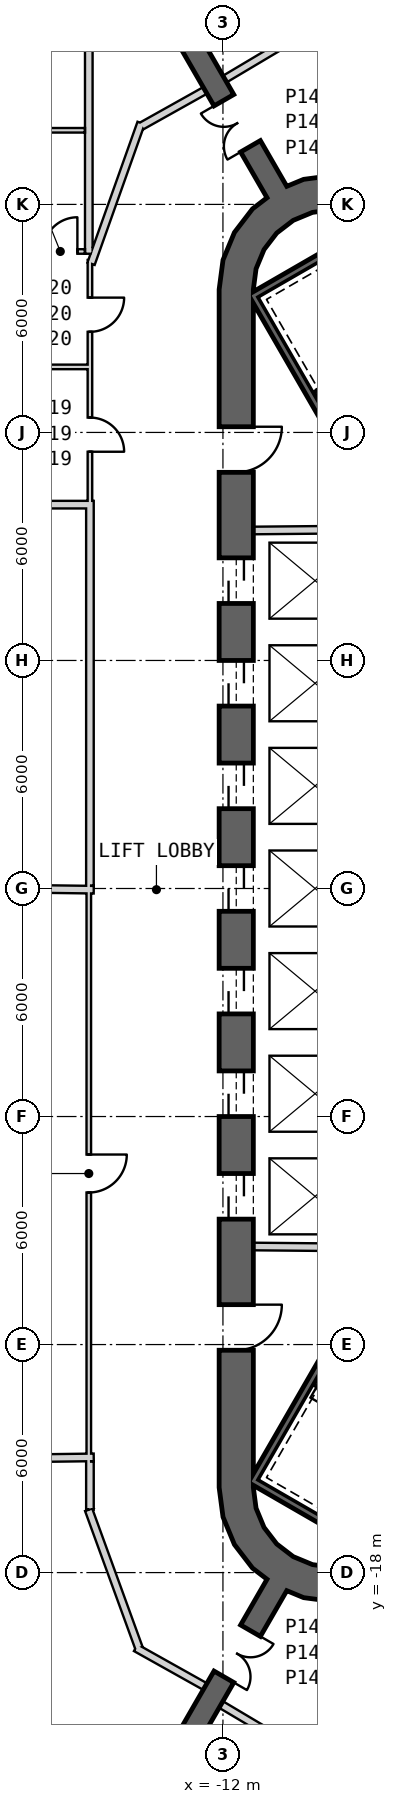
"""IFC4 building model, lengths in metres.
Left out: names, types, materials, properties, quantities, classifications, styles, units other than length and angle.
Written with IfcOpenShell. Run it as: python <this file> out.ifc"""

import sys

from ifc_helpers import new_model, si_unit, direction, frame, frame_2d, origin, place, context, subcontext, project, spatial, polyline, rectangle, outline, extrude, element, fill, save


model = new_model("IFC4")
c1 = context("Model", 3, precision=1e-05, world=origin(), true_north=direction((0.0, 1.0)))
c2 = subcontext(c1, "Body", "Model", "MODEL_VIEW")
j1 = project(units=[si_unit("LENGTHUNIT", "METRE"), si_unit("PLANEANGLEUNIT", "RADIAN")], contexts=[c1])
p1 = place(None, origin())
s1 = spatial("IfcSite", under=j1, at=p1, CompositionType="ELEMENT")
p2 = place(p1, origin())
s2 = spatial("IfcBuilding", under=s1, at=p2, CompositionType="ELEMENT")
p3 = place(p2, frame((0.0, 0.0, 322.1)))
s3 = spatial("IfcBuildingStorey", under=s2, at=p3, CompositionType="ELEMENT", Elevation=322.1)
p4 = place(p3, frame((-11.65, 15.762, 0.0), z_axis=(0.0, 0.0, 1.0), x_axis=(0.0, -1.0, 0.0)))
e1 = element("IfcWall", 1, at=p4, inside=s3, PredefinedType="SHEAR", context=c2, shape_type="SweptSolid", body=[
    extrude(rectangle(XDim=31.523, YDim=0.9, at=frame_2d((15.762, 0.0))), origin(), (0.0, 0.0, 1.0), 3.9),
])
p5 = place(p4, frame((7.062, 0.0, 0.0)))
e2 = element("IfcOpeningElement", 2, at=p5, cuts=e1, PredefinedType="OPENING", context=c2, shape_type="SweptSolid", body=[
    extrude(rectangle(XDim=1.2, YDim=2.4, at=frame_2d((0.6, 1.2))), frame((0.0, 0.46, 0.0), z_axis=(0.0, -1.0, 0.0), x_axis=(1.0, 0.0, 0.0)), (0.0, 0.0, 1.0), 0.92),
])
p6 = place(p4, frame((9.762, 0.0, 0.0)))
e3 = element("IfcOpeningElement", 3, at=p6, cuts=e1, PredefinedType="OPENING", context=c2, shape_type="SweptSolid", body=[
    extrude(rectangle(XDim=1.2, YDim=2.4, at=frame_2d((0.6, 1.2))), frame((0.0, 0.46, 0.0), z_axis=(0.0, -1.0, 0.0), x_axis=(1.0, 0.0, 0.0)), (0.0, 0.0, 1.0), 0.92),
])
p7 = place(p4, frame((12.462, 0.0, 0.0)))
e4 = element("IfcOpeningElement", 4, at=p7, cuts=e1, PredefinedType="OPENING", context=c2, shape_type="SweptSolid", body=[
    extrude(rectangle(XDim=1.2, YDim=2.4, at=frame_2d((0.6, 1.2))), frame((0.0, 0.46, 0.0), z_axis=(0.0, -1.0, 0.0), x_axis=(1.0, 0.0, 0.0)), (0.0, 0.0, 1.0), 0.92),
])
p8 = place(p4, frame((15.162, 0.0, 0.0)))
e5 = element("IfcOpeningElement", 5, at=p8, cuts=e1, PredefinedType="OPENING", context=c2, shape_type="SweptSolid", body=[
    extrude(rectangle(XDim=1.2, YDim=2.4, at=frame_2d((0.6, 1.2))), frame((0.0, 0.46, 0.0), z_axis=(0.0, -1.0, 0.0), x_axis=(1.0, 0.0, 0.0)), (0.0, 0.0, 1.0), 0.92),
])
p9 = place(p4, frame((17.862, 0.0, 0.0)))
e6 = element("IfcOpeningElement", 6, at=p9, cuts=e1, PredefinedType="OPENING", context=c2, shape_type="SweptSolid", body=[
    extrude(rectangle(XDim=1.2, YDim=2.4, at=frame_2d((0.6, 1.2))), frame((0.0, 0.46, 0.0), z_axis=(0.0, -1.0, 0.0), x_axis=(1.0, 0.0, 0.0)), (0.0, 0.0, 1.0), 0.92),
])
p10 = place(p4, frame((20.562, 0.0, 0.0)))
e7 = element("IfcOpeningElement", 7, at=p10, cuts=e1, PredefinedType="OPENING", context=c2, shape_type="SweptSolid", body=[
    extrude(rectangle(XDim=1.2, YDim=2.4, at=frame_2d((0.6, 1.2))), frame((0.0, 0.46, 0.0), z_axis=(0.0, -1.0, 0.0), x_axis=(1.0, 0.0, 0.0)), (0.0, 0.0, 1.0), 0.92),
])
p11 = place(p4, frame((23.262, 0.0, 0.0)))
e8 = element("IfcOpeningElement", 8, at=p11, cuts=e1, PredefinedType="OPENING", context=c2, shape_type="SweptSolid", body=[
    extrude(rectangle(XDim=1.2, YDim=2.4, at=frame_2d((0.6, 1.2))), frame((0.0, 0.46, 0.0), z_axis=(0.0, -1.0, 0.0), x_axis=(1.0, 0.0, 0.0)), (0.0, 0.0, 1.0), 0.92),
])
p12 = place(p4, frame((3.612, 0.0, 0.0)))
e9 = element("IfcOpeningElement", 9, at=p12, cuts=e1, PredefinedType="OPENING", context=c2, shape_type="SweptSolid", body=[
    extrude(rectangle(XDim=1.2, YDim=2.4, at=frame_2d((0.6, 1.2))), frame((0.0, 0.46, 0.0), z_axis=(0.0, -1.0, 0.0), x_axis=(1.0, 0.0, 0.0)), (0.0, 0.0, 1.0), 0.92),
])
p13 = place(p4, frame((26.712, 0.0, 0.0)))
e10 = element("IfcOpeningElement", 10, at=p13, cuts=e1, PredefinedType="OPENING", context=c2, shape_type="SweptSolid", body=[
    extrude(rectangle(XDim=1.2, YDim=2.4, at=frame_2d((0.6, 1.2))), frame((0.0, 0.46, 0.0), z_axis=(0.0, -1.0, 0.0), x_axis=(1.0, 0.0, 0.0)), (0.0, 0.0, 1.0), 0.92),
])
p14 = place(p3, origin())
e11 = element("IfcWall", 11, at=p14, inside=s3, PredefinedType="SHEAR", context=c2, shape_type="SweptSolid", body=[
    extrude(outline(polyline([(-7.6, 18.36), (-8.323, 18.659), (-9.1, 18.762), (-9.876, 18.659), (-10.6, 18.36), (-11.221, 17.883), (-11.698, 17.262), (-11.998, 16.538), (-12.1, 15.762), (-11.2, 15.762), (-11.128, 16.305), (-10.919, 16.812), (-10.585, 17.247), (-10.15, 17.58), (-9.644, 17.79), (-9.1, 17.862), (-8.556, 17.79), (-8.05, 17.58), (-7.6, 18.36)])), origin(), (0.0, 0.0, 1.0), 3.9),
])
p15 = place(p3, origin())
e12 = element("IfcWall", 12, at=p15, inside=s3, PredefinedType="SHEAR", context=c2, shape_type="SweptSolid", body=[
    extrude(outline(polyline([(-12.1, -15.762), (-11.998, -16.538), (-11.698, -17.262), (-11.221, -17.883), (-10.6, -18.36), (-9.876, -18.659), (-9.1, -18.762), (-8.323, -18.659), (-7.6, -18.36), (-8.05, -17.58), (-8.556, -17.79), (-9.1, -17.862), (-9.644, -17.79), (-10.15, -17.58), (-10.585, -17.247), (-10.919, -16.812), (-11.128, -16.305), (-11.2, -15.762), (-12.1, -15.762)])), origin(), (0.0, 0.0, 1.0), 3.9),
])
p16 = place(p3, frame((-10.575, 18.316, 0.0), z_axis=(0.0, 0.0, 1.0), x_axis=(-0.499987805019, 0.866032444446, 0.0)))
e13 = element("IfcWall", 13, at=p16, inside=s3, PredefinedType="SHEAR", context=c2, shape_type="SweptSolid", body=[
    extrude(rectangle(XDim=8.787, YDim=0.6, at=frame_2d((4.394, 0.0))), origin(), (0.0, 0.0, 1.0), 3.9),
])
p17 = place(p16, frame((1.4, 0.0, 0.0)))
e14 = element("IfcOpeningElement", 14, at=p17, cuts=e13, PredefinedType="OPENING", context=c2, shape_type="SweptSolid", body=[
    extrude(rectangle(XDim=1.4, YDim=2.4, at=frame_2d((0.7, 1.2))), frame((0.0, 0.31, 0.0), z_axis=(0.0, -1.0, 0.0), x_axis=(1.0, 0.0, 0.0)), (0.0, 0.0, 1.0), 0.62),
])
p18 = place(p3, frame((-10.575, -18.316, 0.0), z_axis=(0.0, 0.0, 1.0), x_axis=(-0.499987805019, -0.866032444446, 0.0)))
e15 = element("IfcWall", 15, at=p18, inside=s3, PredefinedType="SHEAR", context=c2, shape_type="SweptSolid", body=[
    extrude(rectangle(XDim=8.787, YDim=0.6, at=frame_2d((4.394, 0.0))), origin(), (0.0, 0.0, 1.0), 3.9),
])
p19 = place(p18, frame((1.4, 0.0, 0.0)))
e16 = element("IfcOpeningElement", 16, at=p19, cuts=e15, PredefinedType="OPENING", context=c2, shape_type="SweptSolid", body=[
    extrude(rectangle(XDim=1.4, YDim=2.4, at=frame_2d((0.7, 1.2))), frame((0.0, 0.31, 0.0), z_axis=(0.0, -1.0, 0.0), x_axis=(1.0, 0.0, 0.0)), (0.0, 0.0, 1.0), 0.62),
])
p20 = place(p3, frame((-11.2, 9.42, 0.0), z_axis=(0.0, 0.0, 1.0), x_axis=(0.999957167047, 0.009255488683, 0.0)))
e17 = element("IfcWall", 17, at=p20, inside=s3, PredefinedType="PLUMBINGWALL", context=c2, shape_type="SweptSolid", body=[
    extrude(rectangle(XDim=3.35, YDim=0.2, at=frame_2d((1.675, 0.0))), origin(), (0.0, 0.0, 1.0), 3.6),
])
p21 = place(p3, frame((-8.05, -9.449, 0.0), z_axis=(0.0, 0.0, 1.0), x_axis=(-0.999957467379, 0.009222983926, 0.0)))
e18 = element("IfcWall", 18, at=p21, inside=s3, PredefinedType="PLUMBINGWALL", context=c2, shape_type="SweptSolid", body=[
    extrude(rectangle(XDim=3.15, YDim=0.2, at=frame_2d((1.575, 0.0))), origin(), (0.0, 0.0, 1.0), 3.6),
])
p22 = place(p3, frame((-11.245, 15.678, -0.3), z_axis=(0.0, 0.0, 1.0), x_axis=(0.499977274689, -0.866038523851, 0.0)))
e19 = element("IfcWall", 19, at=p22, inside=s3, PredefinedType="SHEAR", context=c2, shape_type="SweptSolid", body=[
    extrude(rectangle(XDim=8.1, YDim=0.2, at=frame_2d((4.05, 0.0))), origin(), (0.0, 0.0, 1.0), 3.9),
])
for number, where, z_axis, x_axis in (
    (20, (-7.818, 17.541, -0.3), (0.0, 0.0, 1.0), (-0.866, -0.5, 0.0)),
    (21, (-11.282, -15.541, -0.3), (0.0, 0.0, 1.0), (0.866, -0.5, 0.0)),
):
    element("IfcWall", number, at=place(p3, frame(where, z_axis=z_axis, x_axis=x_axis)), inside=s3, PredefinedType="SHEAR", context=c2, shape_type="SweptSolid", body=[
        extrude(rectangle(XDim=3.8, YDim=0.2, at=frame_2d((1.9, 0.0))), origin(), (0.0, 0.0, 1.0), 3.9),
    ])
p23 = place(p3, frame((-7.196, -8.663, -0.3), z_axis=(0.0, 0.0, 1.0), x_axis=(-0.499997992926, -0.866026562566, 0.0)))
e22 = element("IfcWall", 22, at=p23, inside=s3, PredefinedType="SHEAR", context=c2, shape_type="SweptSolid", body=[
    extrude(rectangle(XDim=7.9, YDim=0.2, at=frame_2d((3.95, 0.0))), origin(), (0.0, 0.0, 1.0), 3.9),
])
p24 = place(p3, frame((-15.5, 16.538, 0.0), z_axis=(0.0, 0.0, 1.0), x_axis=(0.0, -1.0, 0.0)))
e23 = element("IfcWall", 23, at=p24, inside=s3, PredefinedType="PARTITIONING", context=c2, shape_type="SweptSolid", body=[
    extrude(rectangle(XDim=6.408, YDim=0.12, at=frame_2d((3.204, 0.0))), origin(), (0.0, 0.0, 1.0), 2.97),
])
p25 = place(p24, frame((4.146, 0.0, 0.0)))
e24 = element("IfcOpeningElement", 24, at=p25, cuts=e23, PredefinedType="OPENING", context=c2, shape_type="SweptSolid", body=[
    extrude(rectangle(XDim=0.9, YDim=2.1, at=frame_2d((0.45, 1.05))), frame((0.0, 0.07, 0.0), z_axis=(0.0, -1.0, 0.0), x_axis=(1.0, 0.0, 0.0)), (0.0, 0.0, 1.0), 0.14),
])
p26 = place(p24, frame((0.99, 0.0, 0.0)))
e25 = element("IfcOpeningElement", 25, at=p26, cuts=e23, PredefinedType="OPENING", context=c2, shape_type="SweptSolid", body=[
    extrude(rectangle(XDim=0.9, YDim=2.1, at=frame_2d((0.45, 1.05))), frame((0.0, 0.07, 0.0), z_axis=(0.0, -1.0, 0.0), x_axis=(1.0, 0.0, 0.0)), (0.0, 0.0, 1.0), 0.14),
])
p27 = place(p3, frame((-15.53, 0.0, 0.0), z_axis=(0.0, 0.0, 1.0), x_axis=(0.0, -1.0, 0.0)))
e26 = element("IfcWall", 26, at=p27, inside=s3, PredefinedType="PARTITIONING", context=c2, shape_type="SweptSolid", body=[
    extrude(rectangle(XDim=15.0, YDim=0.12, at=frame_2d((7.5, 0.0))), origin(), (0.0, 0.0, 1.0), 2.97),
])
p28 = place(p27, frame((7.0, 0.0, 0.0)))
e27 = element("IfcOpeningElement", 27, at=p28, cuts=e26, PredefinedType="OPENING", context=c2, shape_type="SweptSolid", body=[
    extrude(rectangle(XDim=1.0, YDim=2.1, at=frame_2d((0.5, 1.05))), frame((0.0, 0.07, 0.0), z_axis=(0.0, -1.0, 0.0), x_axis=(1.0, 0.0, 0.0)), (0.0, 0.0, 1.0), 0.14),
])
p29 = place(p3, frame((-17.9, -15.001, 0.0), z_axis=(0.0, 0.0, 1.0), x_axis=(0.999915662945, 0.012987185857, 0.0)))
e28 = element("IfcWall", 28, at=p29, inside=s3, PredefinedType="PARTITIONING", context=c2, shape_type="SweptSolid", body=[
    extrude(rectangle(XDim=2.5, YDim=0.2, at=frame_2d((1.25, 0.0))), origin(), (0.0, 0.0, 1.0), 3.6),
])
p30 = place(p3, frame((-15.4, -0.031, 0.0), z_axis=(0.0, 0.0, 1.0), x_axis=(-0.999914782125, 0.013054826261, 0.0)))
e29 = element("IfcWall", 29, at=p30, inside=s3, PredefinedType="PARTITIONING", context=c2, shape_type="SweptSolid", body=[
    extrude(rectangle(XDim=2.3, YDim=0.2, at=frame_2d((1.15, 0.0))), origin(), (0.0, 0.0, 1.0), 3.6),
])
p31 = place(p3, frame((-14.293, -19.978, 0.0), z_axis=(0.0, 0.0, 1.0), x_axis=(0.872510000486, -0.48859625362, 0.0)))
e30 = element("IfcWall", 30, at=p31, inside=s3, PredefinedType="PARTITIONING", context=c2, shape_type="SweptSolid", body=[
    extrude(rectangle(XDim=2.09, YDim=0.2, at=frame_2d((1.045, 0.0))), origin(), (0.0, 0.0, 1.0), 3.6),
])
p32 = place(p3, frame((-15.534, -16.346, 0.0), z_axis=(0.0, 0.0, 1.0), x_axis=(0.342001008711, -0.939699584996, 0.0)))
e31 = element("IfcWall", 31, at=p32, inside=s3, PredefinedType="PARTITIONING", context=c2, shape_type="SweptSolid", body=[
    extrude(rectangle(XDim=3.875, YDim=0.2, at=frame_2d((1.938, 0.0))), origin(), (0.0, 0.0, 1.0), 2.88),
])
p33 = place(p3, frame((-15.5, 10.2, 0.0), z_axis=(0.0, 0.0, 1.0), x_axis=(0.0, -1.0, 0.0)))
e32 = element("IfcWall", 32, at=p33, inside=s3, PredefinedType="PARTITIONING", context=c2, shape_type="SweptSolid", body=[
    extrude(rectangle(XDim=10.13, YDim=0.2, at=frame_2d((5.065, 0.0))), origin(), (0.0, 0.0, 1.0), 2.97),
])
p34 = place(p3, frame((-15.5, -15.07, 0.0), z_axis=(0.0, 0.0, 1.0), x_axis=(0.0, -1.0, 0.0)))
e33 = element("IfcWall", 33, at=p34, inside=s3, PredefinedType="PARTITIONING", context=c2, shape_type="SweptSolid", body=[
    extrude(rectangle(XDim=1.271, YDim=0.2, at=frame_2d((0.635, 0.0))), origin(), (0.0, 0.0, 1.0), 3.6),
])
p35 = place(p3, frame((-14.154, 20.142, 0.0), z_axis=(0.0, 0.0, 1.0), x_axis=(-0.335013345564, -0.94221338257, 0.0)))
e34 = element("IfcWall", 34, at=p35, inside=s3, PredefinedType="PARTITIONING", context=c2, shape_type="SweptSolid", body=[
    extrude(rectangle(XDim=3.929, YDim=0.2, at=frame_2d((1.964, 0.0))), origin(), (0.0, 0.0, 1.0), 2.88),
])
p36 = place(p3, frame((-12.47, 20.999, 0.0), z_axis=(0.0, 0.0, 1.0), x_axis=(-0.87250601595, -0.488603368932, 0.0)))
e35 = element("IfcWall", 35, at=p36, inside=s3, PredefinedType="PARTITIONING", context=c2, shape_type="SweptSolid", body=[
    extrude(rectangle(XDim=1.924, YDim=0.2, at=frame_2d((0.962, 0.0))), origin(), (0.0, 0.0, 1.0), 3.6),
])
p37 = place(p3, frame((-10.155, 22.367, 0.0), z_axis=(0.0, 0.0, 1.0), x_axis=(-0.859343009577, -0.511399640097, 0.0)))
e36 = element("IfcWall", 36, at=p37, inside=s3, PredefinedType="PARTITIONING", context=c2, shape_type="SweptSolid", body=[
    extrude(rectangle(XDim=2.09, YDim=0.2, at=frame_2d((1.045, 0.0))), origin(), (0.0, 0.0, 1.0), 3.6),
])
p38 = place(p3, frame((-6.389, 21.626, 0.0), z_axis=(0.0, 0.0, 1.0), x_axis=(-0.984802578286, 0.173677522442, 0.0)))
e37 = element("IfcWall", 37, at=p38, inside=s3, PredefinedType="PARTITIONING", context=c2, shape_type="SweptSolid", body=[
    extrude(rectangle(XDim=3.875, YDim=0.2, at=frame_2d((1.938, 0.0))), origin(), (0.0, 0.0, 1.0), 2.88),
])
p39 = place(p3, frame((-10.406, -22.538, 0.0), z_axis=(0.0, 0.0, 1.0), x_axis=(0.98480284819, 0.173675991999, 0.0)))
e38 = element("IfcWall", 38, at=p39, inside=s3, PredefinedType="PARTITIONING", context=c2, shape_type="SweptSolid", body=[
    extrude(rectangle(XDim=3.949, YDim=0.2, at=frame_2d((1.974, 0.0))), origin(), (0.0, 0.0, 1.0), 2.88),
])
p40 = place(p3, frame((-12.05, -21.472, 0.0), z_axis=(0.0, 0.0, 1.0), x_axis=(0.859577966481, -0.511004617924, 0.0)))
e39 = element("IfcWall", 39, at=p40, inside=s3, PredefinedType="PARTITIONING", context=c2, shape_type="SweptSolid", body=[
    extrude(rectangle(XDim=1.998, YDim=0.2, at=frame_2d((0.999, 0.0))), origin(), (0.0, 0.0, 1.0), 3.6),
])
p41 = place(p3, frame((-15.6, 10.1, 0.0), z_axis=(0.0, 0.0, 1.0), x_axis=(-1.0, 0.0, 0.0)))
e40 = element("IfcWall", 40, at=p41, inside=s3, PredefinedType="PARTITIONING", context=c2, shape_type="SweptSolid", body=[
    extrude(rectangle(XDim=6.7, YDim=0.2, at=frame_2d((3.35, 0.0))), origin(), (0.0, 0.0, 1.0), 3.6),
])
p42 = place(p3, frame((-15.53, 16.702, 0.0), z_axis=(0.0, 0.0, 1.0), x_axis=(0.0, 1.0, 0.0)))
e41 = element("IfcWall", 41, at=p42, inside=s3, PredefinedType="PARTITIONING", context=c2, shape_type="SweptSolid", body=[
    extrude(rectangle(XDim=3.249, YDim=0.2, at=frame_2d((1.624, 0.0))), origin(), (0.0, 0.0, 1.0), 2.88),
])
p43 = place(p3, frame((-15.53, 19.95, 0.0), z_axis=(0.0, 0.0, 1.0), x_axis=(0.0, 1.0, 0.0)))
e42 = element("IfcWall", 42, at=p43, inside=s3, PredefinedType="PARTITIONING", context=c2, shape_type="SweptSolid", body=[
    extrude(rectangle(XDim=3.34, YDim=0.2, at=frame_2d((1.67, 0.0))), origin(), (0.0, 0.0, 1.0), 3.6),
])
p44 = place(p3, frame((-15.53, 13.724, 0.0), z_axis=(0.0, 0.0, 1.0), x_axis=(-1.0, 0.0, 0.0)))
e43 = element("IfcWall", 43, at=p44, inside=s3, PredefinedType="PARTITIONING", context=c2, shape_type="SweptSolid", body=[
    extrude(rectangle(XDim=6.57, YDim=0.12, at=frame_2d((3.285, 0.0))), origin(), (0.0, 0.0, 1.0), 2.97),
])
p45 = place(p3, frame((-22.1, 16.762, 0.0), z_axis=(0.0, 0.0, 1.0), x_axis=(1.0, 0.0, 0.0)))
e44 = element("IfcWall", 44, at=p45, inside=s3, PredefinedType="PARTITIONING", context=c2, shape_type="SweptSolid", body=[
    extrude(rectangle(XDim=6.47, YDim=0.12, at=frame_2d((3.235, 0.0))), origin(), (0.0, 0.0, 1.0), 3.6),
])
p46 = place(p45, frame((5.37, 0.0, 0.0)))
e45 = element("IfcOpeningElement", 45, at=p46, cuts=e44, PredefinedType="OPENING", context=c2, shape_type="SweptSolid", body=[
    extrude(rectangle(XDim=0.9, YDim=2.1, at=frame_2d((0.45, 1.05))), frame((0.0, 0.07, 0.0), z_axis=(0.0, -1.0, 0.0), x_axis=(1.0, 0.0, 0.0)), (0.0, 0.0, 1.0), 0.14),
])
p47 = place(p3, frame((-22.1, 19.95, 0.0), z_axis=(0.0, 0.0, 1.0), x_axis=(1.0, 0.0, 0.0)))
e46 = element("IfcWall", 46, at=p47, inside=s3, PredefinedType="PARTITIONING", context=c2, shape_type="SweptSolid", body=[
    extrude(rectangle(XDim=6.47, YDim=0.12, at=frame_2d((3.235, 0.0))), origin(), (0.0, 0.0, 1.0), 2.88),
])
p48 = place(p28, origin())
e47 = element("IfcDoor", 47, at=p48, inside=s3, OperationType="SINGLE_SWING_LEFT", PredefinedType="NOTDEFINED", context=c2, shape_type="SweptSolid", body=[
    extrude(rectangle(XDim=1.0, YDim=2.1, at=frame_2d((0.5, 1.05))), frame((0.0, 0.025, 0.0), z_axis=(0.0, -1.0, 0.0), x_axis=(1.0, 0.0, 0.0)), (0.0, 0.0, 1.0), 0.05),
])
fill(e27, e47)
p49 = place(p25, origin())
e48 = element("IfcDoor", 48, at=p49, inside=s3, OperationType="SINGLE_SWING_RIGHT", PredefinedType="NOTDEFINED", context=c2, shape_type="SweptSolid", body=[
    extrude(rectangle(XDim=0.9, YDim=2.1, at=frame_2d((0.45, 1.05))), frame((0.0, 0.025, 0.0), z_axis=(0.0, -1.0, 0.0), x_axis=(1.0, 0.0, 0.0)), (0.0, 0.0, 1.0), 0.05),
])
fill(e24, e48)
p50 = place(p26, origin())
e49 = element("IfcDoor", 49, at=p50, inside=s3, OperationType="SINGLE_SWING_LEFT", PredefinedType="NOTDEFINED", context=c2, shape_type="SweptSolid", body=[
    extrude(rectangle(XDim=0.9, YDim=2.1, at=frame_2d((0.45, 1.05))), frame((0.0, 0.025, 0.0), z_axis=(0.0, -1.0, 0.0), x_axis=(1.0, 0.0, 0.0)), (0.0, 0.0, 1.0), 0.05),
])
fill(e25, e49)
p51 = place(p46, origin())
e50 = element("IfcDoor", 50, at=p51, inside=s3, OperationType="SINGLE_SWING_RIGHT", PredefinedType="NOTDEFINED", context=c2, shape_type="SweptSolid", body=[
    extrude(rectangle(XDim=0.9, YDim=2.1, at=frame_2d((0.45, 1.05))), frame((0.0, 0.025, 0.0), z_axis=(0.0, -1.0, 0.0), x_axis=(1.0, 0.0, 0.0)), (0.0, 0.0, 1.0), 0.05),
])
fill(e45, e50)
p52 = place(p5, origin())
e51 = element("IfcDoor", 51, at=p52, inside=s3, OperationType="SLIDING_TO_LEFT", PredefinedType="USERDEFINED", context=c2, shape_type="SweptSolid", body=[
    extrude(rectangle(XDim=1.2, YDim=2.4, at=frame_2d((0.6, 1.2))), frame((0.0, 0.025, 0.0), z_axis=(0.0, -1.0, 0.0), x_axis=(1.0, 0.0, 0.0)), (0.0, 0.0, 1.0), 0.05),
])
fill(e2, e51)
p53 = place(p6, origin())
e52 = element("IfcDoor", 52, at=p53, inside=s3, OperationType="SLIDING_TO_LEFT", PredefinedType="USERDEFINED", context=c2, shape_type="SweptSolid", body=[
    extrude(rectangle(XDim=1.2, YDim=2.4, at=frame_2d((0.6, 1.2))), frame((0.0, 0.025, 0.0), z_axis=(0.0, -1.0, 0.0), x_axis=(1.0, 0.0, 0.0)), (0.0, 0.0, 1.0), 0.05),
])
fill(e3, e52)
p54 = place(p7, origin())
e53 = element("IfcDoor", 53, at=p54, inside=s3, OperationType="SLIDING_TO_LEFT", PredefinedType="USERDEFINED", context=c2, shape_type="SweptSolid", body=[
    extrude(rectangle(XDim=1.2, YDim=2.4, at=frame_2d((0.6, 1.2))), frame((0.0, 0.025, 0.0), z_axis=(0.0, -1.0, 0.0), x_axis=(1.0, 0.0, 0.0)), (0.0, 0.0, 1.0), 0.05),
])
fill(e4, e53)
p55 = place(p8, origin())
e54 = element("IfcDoor", 54, at=p55, inside=s3, OperationType="SLIDING_TO_LEFT", PredefinedType="USERDEFINED", context=c2, shape_type="SweptSolid", body=[
    extrude(rectangle(XDim=1.2, YDim=2.4, at=frame_2d((0.6, 1.2))), frame((0.0, 0.025, 0.0), z_axis=(0.0, -1.0, 0.0), x_axis=(1.0, 0.0, 0.0)), (0.0, 0.0, 1.0), 0.05),
])
fill(e5, e54)
p56 = place(p9, origin())
e55 = element("IfcDoor", 55, at=p56, inside=s3, OperationType="SLIDING_TO_LEFT", PredefinedType="USERDEFINED", context=c2, shape_type="SweptSolid", body=[
    extrude(rectangle(XDim=1.2, YDim=2.4, at=frame_2d((0.6, 1.2))), frame((0.0, 0.025, 0.0), z_axis=(0.0, -1.0, 0.0), x_axis=(1.0, 0.0, 0.0)), (0.0, 0.0, 1.0), 0.05),
])
fill(e6, e55)
p57 = place(p10, origin())
e56 = element("IfcDoor", 56, at=p57, inside=s3, OperationType="SLIDING_TO_LEFT", PredefinedType="USERDEFINED", context=c2, shape_type="SweptSolid", body=[
    extrude(rectangle(XDim=1.2, YDim=2.4, at=frame_2d((0.6, 1.2))), frame((0.0, 0.025, 0.0), z_axis=(0.0, -1.0, 0.0), x_axis=(1.0, 0.0, 0.0)), (0.0, 0.0, 1.0), 0.05),
])
fill(e7, e56)
p58 = place(p11, origin())
e57 = element("IfcDoor", 57, at=p58, inside=s3, OperationType="SLIDING_TO_LEFT", PredefinedType="USERDEFINED", context=c2, shape_type="SweptSolid", body=[
    extrude(rectangle(XDim=1.2, YDim=2.4, at=frame_2d((0.6, 1.2))), frame((0.0, 0.025, 0.0), z_axis=(0.0, -1.0, 0.0), x_axis=(1.0, 0.0, 0.0)), (0.0, 0.0, 1.0), 0.05),
])
fill(e8, e57)
p59 = place(p12, origin())
e58 = element("IfcDoor", 58, at=p59, inside=s3, OperationType="SINGLE_SWING_LEFT", PredefinedType="USERDEFINED", context=c2, shape_type="SweptSolid", body=[
    extrude(rectangle(XDim=1.2, YDim=2.4, at=frame_2d((0.6, 1.2))), frame((0.0, 0.025, 0.0), z_axis=(0.0, -1.0, 0.0), x_axis=(1.0, 0.0, 0.0)), (0.0, 0.0, 1.0), 0.05),
])
fill(e9, e58)
p60 = place(p13, origin())
e59 = element("IfcDoor", 59, at=p60, inside=s3, OperationType="SINGLE_SWING_LEFT", PredefinedType="USERDEFINED", context=c2, shape_type="SweptSolid", body=[
    extrude(rectangle(XDim=1.2, YDim=2.4, at=frame_2d((0.6, 1.2))), frame((0.0, 0.025, 0.0), z_axis=(0.0, -1.0, 0.0), x_axis=(1.0, 0.0, 0.0)), (0.0, 0.0, 1.0), 0.05),
])
fill(e10, e59)
p61 = place(p17, origin())
e60 = element("IfcDoor", 60, at=p61, inside=s3, OperationType="DOUBLE_DOOR_SINGLE_SWING", PredefinedType="NOTDEFINED", context=c2, shape_type="SweptSolid", body=[
    extrude(rectangle(XDim=1.4, YDim=2.4, at=frame_2d((0.7, 1.2))), frame((0.0, 0.025, 0.0), z_axis=(0.0, -1.0, 0.0), x_axis=(1.0, 0.0, 0.0)), (0.0, 0.0, 1.0), 0.05),
])
fill(e14, e60)
p62 = place(p19, origin())
e61 = element("IfcDoor", 61, at=p62, inside=s3, OperationType="DOUBLE_DOOR_SINGLE_SWING", PredefinedType="NOTDEFINED", context=c2, shape_type="SweptSolid", body=[
    extrude(rectangle(XDim=1.4, YDim=2.4, at=frame_2d((0.7, 1.2))), frame((0.0, 0.025, 0.0), z_axis=(0.0, -1.0, 0.0), x_axis=(1.0, 0.0, 0.0)), (0.0, 0.0, 1.0), 0.05),
])
fill(e16, e61)
save(model, sys.argv[1])
